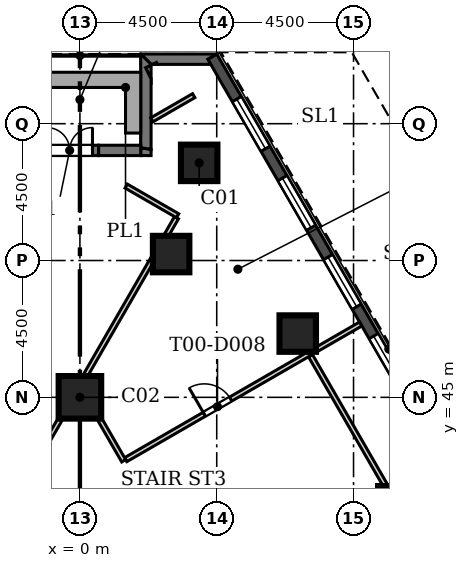
"""IFC4 building model, lengths in metres.
Left out: names, types, materials, properties, quantities, classifications, styles, units other than length and angle.
Written with IfcOpenShell. Run it as: python <this file> out.ifc"""

import sys

from ifc_helpers import new_model, si_unit, direction, frame, frame_2d, origin, origin_2d, place, context, subcontext, project, spatial, polyline, rectangle, hollow_rectangle, outline, extrude, element, fill, save


model = new_model("IFC4")
c1 = context("Model", 3, precision=1e-05, world=origin(), true_north=direction((0.0, 1.0)))
c2 = subcontext(c1, "Body", "Model", "MODEL_VIEW")
j1 = project(units=[si_unit("LENGTHUNIT", "METRE"), si_unit("PLANEANGLEUNIT", "RADIAN")], contexts=[c1])
p1 = place(None, origin())
s1 = spatial("IfcSite", under=j1, at=p1, CompositionType="ELEMENT")
p2 = place(p1, origin())
s2 = spatial("IfcBuilding", under=s1, at=p2, CompositionType="ELEMENT")
p3 = place(p2, frame((0.0, 0.0, 25.0)))
s3 = spatial("IfcBuildingStorey", under=s2, at=p3, CompositionType="ELEMENT", Elevation=25.0)
for number, where, z_axis, x_axis in (
    (1, (10.406, 41.482, 0.0), (0.0, 0.0, 1.0), (1.0, 0.0, 0.0)),
    (2, (7.164, 47.097, 0.0), (0.0, 0.0, 1.0), (1.0, 0.0, 0.0)),
    (3, (3.923, 52.712, 0.0), (0.0, 0.0, 1.0), (1.0, 0.0, 0.0)),
    (4, (3.0, 49.712, 0.0), (0.0, 0.0, 1.0), (1.0, 0.0, 0.0)),
):
    element("IfcColumn", number, at=place(p3, frame(where, z_axis=z_axis, x_axis=x_axis)), inside=s3, PredefinedType="COLUMN", context=c2, shape_type="SweptSolid", body=[
        extrude(rectangle(XDim=1.2, YDim=1.2, at=origin_2d()), origin(), (0.0, 0.0, 1.0), 4.5),
    ])
p4 = place(p3, frame((0.0, 45.0, 0.0), z_axis=(0.0, 0.0, 1.0), x_axis=(1.0, 0.0, 0.0)))
e5 = element("IfcColumn", 5, at=p4, inside=s3, PredefinedType="COLUMN", context=c2, shape_type="SweptSolid", body=[
    extrude(rectangle(XDim=1.4, YDim=1.4, at=origin_2d()), origin(), (0.0, 0.0, 1.0), 4.5),
])
p5 = place(p3, frame((32.353, 7.709, 0.0), z_axis=(0.0, 0.0, 1.0), x_axis=(-0.500000836325, 0.866024920931, 0.0)))
e6 = element("IfcWall", 6, at=p5, inside=s3, PredefinedType="SOLIDWALL", context=c2, shape_type="SweptSolid", body=[
    extrude(rectangle(XDim=56.0, YDim=0.34, at=frame_2d((28.0, 0.0))), origin(), (0.0, 0.0, 1.0), 4.2),
])
p6 = place(p5, frame((1.5, 0.0, 0.9)))
e7 = element("IfcOpeningElement", 7, at=p6, cuts=e6, PredefinedType="OPENING", context=c2, shape_type="SweptSolid", body=[
    extrude(rectangle(XDim=1.885, YDim=3.0, at=frame_2d((0.942, 1.5))), frame((0.0, 0.18, 0.0), z_axis=(0.0, -1.0, 0.0), x_axis=(1.0, 0.0, 0.0)), (0.0, 0.0, 1.0), 0.36),
])
p7 = place(p5, frame((4.5, 0.0, 0.9)))
e8 = element("IfcOpeningElement", 8, at=p7, cuts=e6, PredefinedType="OPENING", context=c2, shape_type="SweptSolid", body=[
    extrude(rectangle(XDim=1.885, YDim=3.0, at=frame_2d((0.942, 1.5))), frame((0.0, 0.18, 0.0), z_axis=(0.0, -1.0, 0.0), x_axis=(1.0, 0.0, 0.0)), (0.0, 0.0, 1.0), 0.36),
])
p8 = place(p5, frame((7.5, 0.0, 0.9)))
e9 = element("IfcOpeningElement", 9, at=p8, cuts=e6, PredefinedType="OPENING", context=c2, shape_type="SweptSolid", body=[
    extrude(rectangle(XDim=1.885, YDim=3.0, at=frame_2d((0.942, 1.5))), frame((0.0, 0.18, 0.0), z_axis=(0.0, -1.0, 0.0), x_axis=(1.0, 0.0, 0.0)), (0.0, 0.0, 1.0), 0.36),
])
p9 = place(p5, frame((10.5, 0.0, 0.9)))
e10 = element("IfcOpeningElement", 10, at=p9, cuts=e6, PredefinedType="OPENING", context=c2, shape_type="SweptSolid", body=[
    extrude(rectangle(XDim=1.885, YDim=3.0, at=frame_2d((0.942, 1.5))), frame((0.0, 0.18, 0.0), z_axis=(0.0, -1.0, 0.0), x_axis=(1.0, 0.0, 0.0)), (0.0, 0.0, 1.0), 0.36),
])
p10 = place(p5, frame((13.5, 0.0, 0.9)))
e11 = element("IfcOpeningElement", 11, at=p10, cuts=e6, PredefinedType="OPENING", context=c2, shape_type="SweptSolid", body=[
    extrude(rectangle(XDim=1.885, YDim=3.0, at=frame_2d((0.942, 1.5))), frame((0.0, 0.18, 0.0), z_axis=(0.0, -1.0, 0.0), x_axis=(1.0, 0.0, 0.0)), (0.0, 0.0, 1.0), 0.36),
])
p11 = place(p5, frame((16.5, 0.0, 0.9)))
e12 = element("IfcOpeningElement", 12, at=p11, cuts=e6, PredefinedType="OPENING", context=c2, shape_type="SweptSolid", body=[
    extrude(rectangle(XDim=1.885, YDim=3.0, at=frame_2d((0.942, 1.5))), frame((0.0, 0.18, 0.0), z_axis=(0.0, -1.0, 0.0), x_axis=(1.0, 0.0, 0.0)), (0.0, 0.0, 1.0), 0.36),
])
p12 = place(p5, frame((19.5, 0.0, 0.9)))
e13 = element("IfcOpeningElement", 13, at=p12, cuts=e6, PredefinedType="OPENING", context=c2, shape_type="SweptSolid", body=[
    extrude(rectangle(XDim=1.885, YDim=3.0, at=frame_2d((0.942, 1.5))), frame((0.0, 0.18, 0.0), z_axis=(0.0, -1.0, 0.0), x_axis=(1.0, 0.0, 0.0)), (0.0, 0.0, 1.0), 0.36),
])
p13 = place(p5, frame((22.5, 0.0, 0.9)))
e14 = element("IfcOpeningElement", 14, at=p13, cuts=e6, PredefinedType="OPENING", context=c2, shape_type="SweptSolid", body=[
    extrude(rectangle(XDim=1.885, YDim=3.0, at=frame_2d((0.942, 1.5))), frame((0.0, 0.18, 0.0), z_axis=(0.0, -1.0, 0.0), x_axis=(1.0, 0.0, 0.0)), (0.0, 0.0, 1.0), 0.36),
])
p14 = place(p5, frame((25.5, 0.0, 0.9)))
e15 = element("IfcOpeningElement", 15, at=p14, cuts=e6, PredefinedType="OPENING", context=c2, shape_type="SweptSolid", body=[
    extrude(rectangle(XDim=1.885, YDim=3.0, at=frame_2d((0.942, 1.5))), frame((0.0, 0.18, 0.0), z_axis=(0.0, -1.0, 0.0), x_axis=(1.0, 0.0, 0.0)), (0.0, 0.0, 1.0), 0.36),
])
p15 = place(p5, frame((28.5, 0.0, 0.9)))
e16 = element("IfcOpeningElement", 16, at=p15, cuts=e6, PredefinedType="OPENING", context=c2, shape_type="SweptSolid", body=[
    extrude(rectangle(XDim=1.885, YDim=3.0, at=frame_2d((0.942, 1.5))), frame((0.0, 0.18, 0.0), z_axis=(0.0, -1.0, 0.0), x_axis=(1.0, 0.0, 0.0)), (0.0, 0.0, 1.0), 0.36),
])
p16 = place(p5, frame((31.5, 0.0, 0.0)))
e17 = element("IfcOpeningElement", 17, at=p16, cuts=e6, PredefinedType="OPENING", context=c2, shape_type="SweptSolid", body=[
    extrude(rectangle(XDim=1.885, YDim=2.6, at=frame_2d((0.942, 1.3))), frame((0.0, 0.18, 0.0), z_axis=(0.0, -1.0, 0.0), x_axis=(1.0, 0.0, 0.0)), (0.0, 0.0, 1.0), 0.36),
])
p17 = place(p5, frame((34.5, 0.0, 0.9)))
e18 = element("IfcOpeningElement", 18, at=p17, cuts=e6, PredefinedType="OPENING", context=c2, shape_type="SweptSolid", body=[
    extrude(rectangle(XDim=1.885, YDim=3.0, at=frame_2d((0.942, 1.5))), frame((0.0, 0.18, 0.0), z_axis=(0.0, -1.0, 0.0), x_axis=(1.0, 0.0, 0.0)), (0.0, 0.0, 1.0), 0.36),
])
p18 = place(p5, frame((37.5, 0.0, 0.9)))
e19 = element("IfcOpeningElement", 19, at=p18, cuts=e6, PredefinedType="OPENING", context=c2, shape_type="SweptSolid", body=[
    extrude(rectangle(XDim=1.885, YDim=3.0, at=frame_2d((0.942, 1.5))), frame((0.0, 0.18, 0.0), z_axis=(0.0, -1.0, 0.0), x_axis=(1.0, 0.0, 0.0)), (0.0, 0.0, 1.0), 0.36),
])
p19 = place(p5, frame((40.5, 0.0, 0.9)))
e20 = element("IfcOpeningElement", 20, at=p19, cuts=e6, PredefinedType="OPENING", context=c2, shape_type="SweptSolid", body=[
    extrude(rectangle(XDim=1.885, YDim=3.0, at=frame_2d((0.942, 1.5))), frame((0.0, 0.18, 0.0), z_axis=(0.0, -1.0, 0.0), x_axis=(1.0, 0.0, 0.0)), (0.0, 0.0, 1.0), 0.36),
])
p20 = place(p5, frame((43.5, 0.0, 0.9)))
e21 = element("IfcOpeningElement", 21, at=p20, cuts=e6, PredefinedType="OPENING", context=c2, shape_type="SweptSolid", body=[
    extrude(rectangle(XDim=1.885, YDim=3.0, at=frame_2d((0.942, 1.5))), frame((0.0, 0.18, 0.0), z_axis=(0.0, -1.0, 0.0), x_axis=(1.0, 0.0, 0.0)), (0.0, 0.0, 1.0), 0.36),
])
p21 = place(p5, frame((46.5, 0.0, 0.9)))
e22 = element("IfcOpeningElement", 22, at=p21, cuts=e6, PredefinedType="OPENING", context=c2, shape_type="SweptSolid", body=[
    extrude(rectangle(XDim=1.885, YDim=3.0, at=frame_2d((0.942, 1.5))), frame((0.0, 0.18, 0.0), z_axis=(0.0, -1.0, 0.0), x_axis=(1.0, 0.0, 0.0)), (0.0, 0.0, 1.0), 0.36),
])
p22 = place(p5, frame((49.5, 0.0, 0.9)))
e23 = element("IfcOpeningElement", 23, at=p22, cuts=e6, PredefinedType="OPENING", context=c2, shape_type="SweptSolid", body=[
    extrude(rectangle(XDim=1.885, YDim=3.0, at=frame_2d((0.942, 1.5))), frame((0.0, 0.18, 0.0), z_axis=(0.0, -1.0, 0.0), x_axis=(1.0, 0.0, 0.0)), (0.0, 0.0, 1.0), 0.36),
])
p23 = place(p5, frame((52.5, 0.0, 0.9)))
e24 = element("IfcOpeningElement", 24, at=p23, cuts=e6, PredefinedType="OPENING", context=c2, shape_type="SweptSolid", body=[
    extrude(rectangle(XDim=1.885, YDim=3.0, at=frame_2d((0.942, 1.5))), frame((0.0, 0.18, 0.0), z_axis=(0.0, -1.0, 0.0), x_axis=(1.0, 0.0, 0.0)), (0.0, 0.0, 1.0), 0.36),
])
p24 = place(p3, origin())
e25 = element("IfcWall", 25, at=p24, inside=s3, PredefinedType="SOLIDWALL", context=c2, shape_type="SweptSolid", body=[
    extrude(outline(polyline([(2.386, 55.951), (2.52, 56.017), (2.552, 55.951), (2.386, 55.951)])), origin(), (0.0, 0.0, 1.0), 3.6),
])
p25 = place(p3, origin())
e26 = element("IfcWall", 26, at=p25, inside=s3, PredefinedType="SOLIDWALL", context=c2, shape_type="SweptSolid", body=[
    extrude(outline(polyline([(4.501, 56.292), (4.501, 56.292), (4.206, 56.121), (4.305, 55.951), (2.552, 55.951), (2.52, 56.017), (2.386, 55.951), (2.34, 55.951), (1.999, 56.292), (1.999, 56.292), (4.501, 56.292)])), origin(), (0.0, 0.0, 1.0), 4.2),
])
p26 = place(p3, origin())
e27 = element("IfcWall", 27, at=p26, inside=s3, PredefinedType="SOLIDWALL", context=c2, shape_type="SweptSolid", body=[
    extrude(outline(polyline([(2.341, 55.474), (2.161, 55.84), (2.341, 55.928), (2.341, 55.474)])), origin(), (0.0, 0.0, 1.0), 3.6),
])
p27 = place(p3, origin())
e28 = element("IfcWall", 28, at=p27, inside=s3, PredefinedType="SOLIDWALL", context=c2, shape_type="SweptSolid", body=[
    extrude(outline(polyline([(2.0, 53.21), (2.341, 53.157), (2.341, 52.951), (2.0, 52.951), (2.0, 53.21)])), origin(), (0.0, 0.0, 1.0), 3.6),
])
p28 = place(p3, origin())
e29 = element("IfcWall", 29, at=p28, inside=s3, PredefinedType="SOLIDWALL", context=c2, shape_type="SweptSolid", body=[
    extrude(outline(polyline([(2.0, 56.293), (2.0, 56.293), (2.341, 55.952), (2.341, 55.928), (2.161, 55.84), (2.341, 55.474), (2.341, 53.157), (2.0, 53.21), (2.0, 56.293)])), origin(), (0.0, 0.0, 1.0), 4.2),
])
p29 = place(p3, frame((2.0, 53.122, 0.0), z_axis=(0.0, 0.0, 1.0), x_axis=(-1.0, 0.0, 0.0)))
e30 = element("IfcWall", 30, at=p29, inside=s3, PredefinedType="SOLIDWALL", context=c2, shape_type="SweptSolid", body=[
    extrude(rectangle(XDim=1.387, YDim=0.34, at=frame_2d((0.693, 0.0))), origin(), (0.0, 0.0, 1.0), 3.6),
])
p30 = place(p3, frame((0.613, 53.122, 0.0), z_axis=(0.0, 0.0, 1.0), x_axis=(-1.0, 0.0, 0.0)))
e31 = element("IfcWall", 31, at=p30, inside=s3, PredefinedType="SOLIDWALL", context=c2, shape_type="SweptSolid", body=[
    extrude(rectangle(XDim=2.613, YDim=0.34, at=frame_2d((1.307, 0.0))), origin(), (0.0, 0.0, 1.0), 4.2),
])
p31 = place(p30, frame((0.2, 0.0, 0.0)))
e32 = element("IfcOpeningElement", 32, at=p31, cuts=e31, PredefinedType="OPENING", context=c2, shape_type="SweptSolid", body=[
    extrude(rectangle(XDim=1.5, YDim=2.4, at=frame_2d((0.75, 1.2))), frame((0.0, 0.18, 0.0), z_axis=(0.0, -1.0, 0.0), x_axis=(1.0, 0.0, 0.0)), (0.0, 0.0, 1.0), 0.36),
])
p32 = place(p3, origin())
e33 = element("IfcWall", 33, at=p32, inside=s3, PredefinedType="USERDEFINED", context=c2, shape_type="SweptSolid", body=[
    extrude(outline(polyline([(-1.5, 55.692), (-2.0, 55.692), (-2.0, 55.192), (-2.0, 53.692), (-1.5, 53.692), (-1.5, 55.192), (1.5, 55.192), (1.5, 53.692), (2.0, 53.692), (2.0, 55.192), (2.0, 55.692), (1.5, 55.692), (-1.5, 55.692)])), origin(), (0.0, 0.0, 1.0), 1.1),
])
p33 = place(p2, frame((0.0, 0.0, 20.0)))
s4 = spatial("IfcBuildingStorey", under=s2, at=p33, CompositionType="ELEMENT", Elevation=20.0)
for number, where, z_axis, x_axis in (
    (34, (8.74, 56.0, 5.0), (0.0, 0.0, 1.0), (1.0, 0.0, 0.0)),
    (35, (5.125, 56.07, 5.0), (0.0, 0.0, 1.0), (1.0, 0.0, 0.0)),
):
    element("IfcColumn", number, at=place(p33, frame(where, z_axis=z_axis, x_axis=x_axis)), inside=s4, PredefinedType="COLUMN", context=c2, shape_type="SweptSolid", body=[
        extrude(hollow_rectangle(XDim=0.25, YDim=0.25, WallThickness=0.012, at=origin_2d()), origin(), (0.0, 0.0, 1.0), 3.6),
    ])
p34 = place(p3, frame((7.764, 46.563, 0.0), z_axis=(0.0, 0.0, 1.0), x_axis=(0.866039477586, 0.499975622669, 0.0)))
e36 = element("IfcWall", 36, at=p34, inside=s3, PredefinedType="PARTITIONING", context=c2, shape_type="SweptSolid", body=[
    extrude(rectangle(XDim=1.697, YDim=0.15, at=frame_2d((0.849, 0.0))), origin(), (0.0, 0.0, 1.0), 4.2),
])
p35 = place(p3, frame((3.743, 54.922, 0.0), z_axis=(0.0, 0.0, 1.0), x_axis=(-0.866052668871, -0.499952772512, 0.0)))
e37 = element("IfcWall", 37, at=p35, inside=s3, PredefinedType="PARTITIONING", context=c2, shape_type="SweptSolid", body=[
    extrude(rectangle(XDim=1.591, YDim=0.15, at=frame_2d((0.795, 0.0))), origin(), (0.0, 0.0, 1.0), 4.2),
])
p36 = place(p3, frame((10.06, 42.082, 0.0), z_axis=(0.0, 0.0, 1.0), x_axis=(-0.500019708872, 0.866014024563, 0.0)))
e38 = element("IfcWall", 38, at=p36, inside=s3, PredefinedType="PARTITIONING", context=c2, shape_type="SweptSolid", body=[
    extrude(rectangle(XDim=4.953, YDim=0.15, at=frame_2d((2.477, 0.0))), origin(), (0.0, 0.0, 1.0), 3.4),
])
p37 = place(p3, frame((7.546, 46.437, 0.0), z_axis=(0.0, 0.0, 1.0), x_axis=(-0.866037534292, -0.499978988757, 0.0)))
e39 = element("IfcWall", 39, at=p37, inside=s3, PredefinedType="PARTITIONING", context=c2, shape_type="SweptSolid", body=[
    extrude(rectangle(XDim=6.975, YDim=0.15, at=frame_2d((3.487, 0.0))), origin(), (0.0, 0.0, 1.0), 4.2),
])
p38 = place(p37, frame((2.988, 0.0, 0.0)))
e40 = element("IfcOpeningElement", 40, at=p38, cuts=e39, PredefinedType="OPENING", context=c2, shape_type="SweptSolid", body=[
    extrude(rectangle(XDim=1.0, YDim=2.1, at=frame_2d((0.5, 1.05))), frame((0.0, 0.085, 0.0), z_axis=(0.0, -1.0, 0.0), x_axis=(1.0, 0.0, 0.0)), (0.0, 0.0, 1.0), 0.17),
])
p39 = place(p3, frame((1.44, 42.912, 0.0), z_axis=(0.0, 0.0, 1.0), x_axis=(-0.500069551962, 0.865985244216, 0.0)))
e41 = element("IfcWall", 41, at=p39, inside=s3, PredefinedType="PARTITIONING", context=c2, shape_type="SweptSolid", body=[
    extrude(rectangle(XDim=1.603, YDim=0.15, at=frame_2d((0.802, 0.0))), origin(), (0.0, 0.0, 1.0), 4.2),
])
p40 = place(p3, frame((0.17, 45.7, 0.0), z_axis=(0.0, 0.0, 1.0), x_axis=(0.499965681329, 0.866045216772, 0.0)))
e42 = element("IfcWall", 42, at=p40, inside=s3, PredefinedType="PARTITIONING", context=c2, shape_type="SweptSolid", body=[
    extrude(rectangle(XDim=4.46, YDim=0.15, at=frame_2d((2.23, 0.0))), origin(), (0.0, 0.0, 1.0), 4.2),
])
p41 = place(p3, frame((2.833, 50.312, 0.0), z_axis=(0.0, 0.0, 1.0), x_axis=(0.5001118933, 0.865960792519, 0.0)))
e43 = element("IfcWall", 43, at=p41, inside=s3, PredefinedType="PARTITIONING", context=c2, shape_type="SweptSolid", body=[
    extrude(rectangle(XDim=0.687, YDim=0.15, at=frame_2d((0.344, 0.0))), origin(), (0.0, 0.0, 1.0), 4.2),
])
p42 = place(p3, frame((3.214, 50.972, 0.0), z_axis=(0.0, 0.0, 1.0), x_axis=(-0.866004557827, 0.500036104519, 0.0)))
e44 = element("IfcWall", 44, at=p42, inside=s3, PredefinedType="PARTITIONING", context=c2, shape_type="SweptSolid", body=[
    extrude(rectangle(XDim=1.954, YDim=0.15, at=frame_2d((0.977, 0.0))), origin(), (0.0, 0.0, 1.0), 4.2),
])
p43 = place(p3, frame((-2.883, 40.413, 0.0), z_axis=(0.0, 0.0, 1.0), x_axis=(0.500000259638, 0.866025253883, 0.0)))
e45 = element("IfcWall", 45, at=p43, inside=s3, PredefinedType="PARTITIONING", context=c2, shape_type="SweptSolid", body=[
    extrude(rectangle(XDim=4.488, YDim=0.15, at=frame_2d((2.244, 0.0))), origin(), (0.0, 0.0, 1.0), 4.2),
])
p44 = place(p20, origin())
e46 = element("IfcWindow", 46, at=p44, inside=s3, PartitioningType="SINGLE_PANEL", PredefinedType="WINDOW", context=c2, shape_type="SweptSolid", body=[
    extrude(rectangle(XDim=1.885, YDim=3.0, at=frame_2d((0.942, 1.5))), frame((0.0, 0.11, 0.0), z_axis=(0.0, -1.0, 0.0), x_axis=(1.0, 0.0, 0.0)), (0.0, 0.0, 1.0), 0.06),
])
fill(e21, e46)
p45 = place(p21, origin())
e47 = element("IfcWindow", 47, at=p45, inside=s3, PartitioningType="SINGLE_PANEL", PredefinedType="WINDOW", context=c2, shape_type="SweptSolid", body=[
    extrude(rectangle(XDim=1.885, YDim=3.0, at=frame_2d((0.942, 1.5))), frame((0.0, 0.11, 0.0), z_axis=(0.0, -1.0, 0.0), x_axis=(1.0, 0.0, 0.0)), (0.0, 0.0, 1.0), 0.06),
])
fill(e22, e47)
p46 = place(p22, origin())
e48 = element("IfcWindow", 48, at=p46, inside=s3, PartitioningType="SINGLE_PANEL", PredefinedType="WINDOW", context=c2, shape_type="SweptSolid", body=[
    extrude(rectangle(XDim=1.885, YDim=3.0, at=frame_2d((0.942, 1.5))), frame((0.0, 0.11, 0.0), z_axis=(0.0, -1.0, 0.0), x_axis=(1.0, 0.0, 0.0)), (0.0, 0.0, 1.0), 0.06),
])
fill(e23, e48)
p47 = place(p23, origin())
e49 = element("IfcWindow", 49, at=p47, inside=s3, PartitioningType="SINGLE_PANEL", PredefinedType="WINDOW", context=c2, shape_type="SweptSolid", body=[
    extrude(rectangle(XDim=1.885, YDim=3.0, at=frame_2d((0.942, 1.5))), frame((0.0, 0.11, 0.0), z_axis=(0.0, -1.0, 0.0), x_axis=(1.0, 0.0, 0.0)), (0.0, 0.0, 1.0), 0.06),
])
fill(e24, e49)
p48 = place(p31, frame((1.5, 0.0, 0.0), z_axis=(0.0, 0.0, 1.0), x_axis=(-1.0, 0.0, 0.0)))
e50 = element("IfcDoor", 50, at=p48, inside=s3, OperationType="DOUBLE_DOOR_SINGLE_SWING", PredefinedType="DOOR", context=c2, shape_type="SweptSolid", body=[
    extrude(rectangle(XDim=1.5, YDim=2.4, at=frame_2d((0.75, 1.2))), frame((0.0, 0.025, 0.0), z_axis=(0.0, -1.0, 0.0), x_axis=(1.0, 0.0, 0.0)), (0.0, 0.0, 1.0), 0.05),
])
fill(e32, e50)
p49 = place(p3, frame((0.0, 0.0, 4.0)))
p50 = place(p49, frame((10.605, 49.71, 0.0)))
p51 = place(p50, frame((0.0, 0.0, 0.15)))
e51 = element("IfcWindow", 51, at=p51, inside=s3, PartitioningType="SINGLE_PANEL", PredefinedType="SKYLIGHT", context=c2, shape_type="SweptSolid", body=[
    extrude(rectangle(XDim=1.2, YDim=2.4, at=origin_2d()), origin(), (0.0, 0.0, 1.0), 0.05),
])
p52 = place(p49, frame((7.906, 54.21, 0.0)))
p53 = place(p52, frame((0.0, 0.0, 0.15)))
e52 = element("IfcWindow", 52, at=p53, inside=s3, PartitioningType="SINGLE_PANEL", PredefinedType="SKYLIGHT", context=c2, shape_type="SweptSolid", body=[
    extrude(rectangle(XDim=1.2, YDim=2.4, at=origin_2d()), origin(), (0.0, 0.0, 1.0), 0.05),
])
p54 = place(p38, frame((1.0, 0.0, 0.0), z_axis=(0.0, 0.0, 1.0), x_axis=(-1.0, 0.0, 0.0)))
e53 = element("IfcDoor", 53, at=p54, inside=s3, OperationType="SINGLE_SWING_LEFT", PredefinedType="DOOR", context=c2, shape_type="SweptSolid", body=[
    extrude(rectangle(XDim=1.0, YDim=2.1, at=frame_2d((0.5, 1.05))), frame((0.0, 0.025, 0.0), z_axis=(0.0, -1.0, 0.0), x_axis=(1.0, 0.0, 0.0)), (0.0, 0.0, 1.0), 0.05),
])
fill(e40, e53)
save(model, sys.argv[1])
